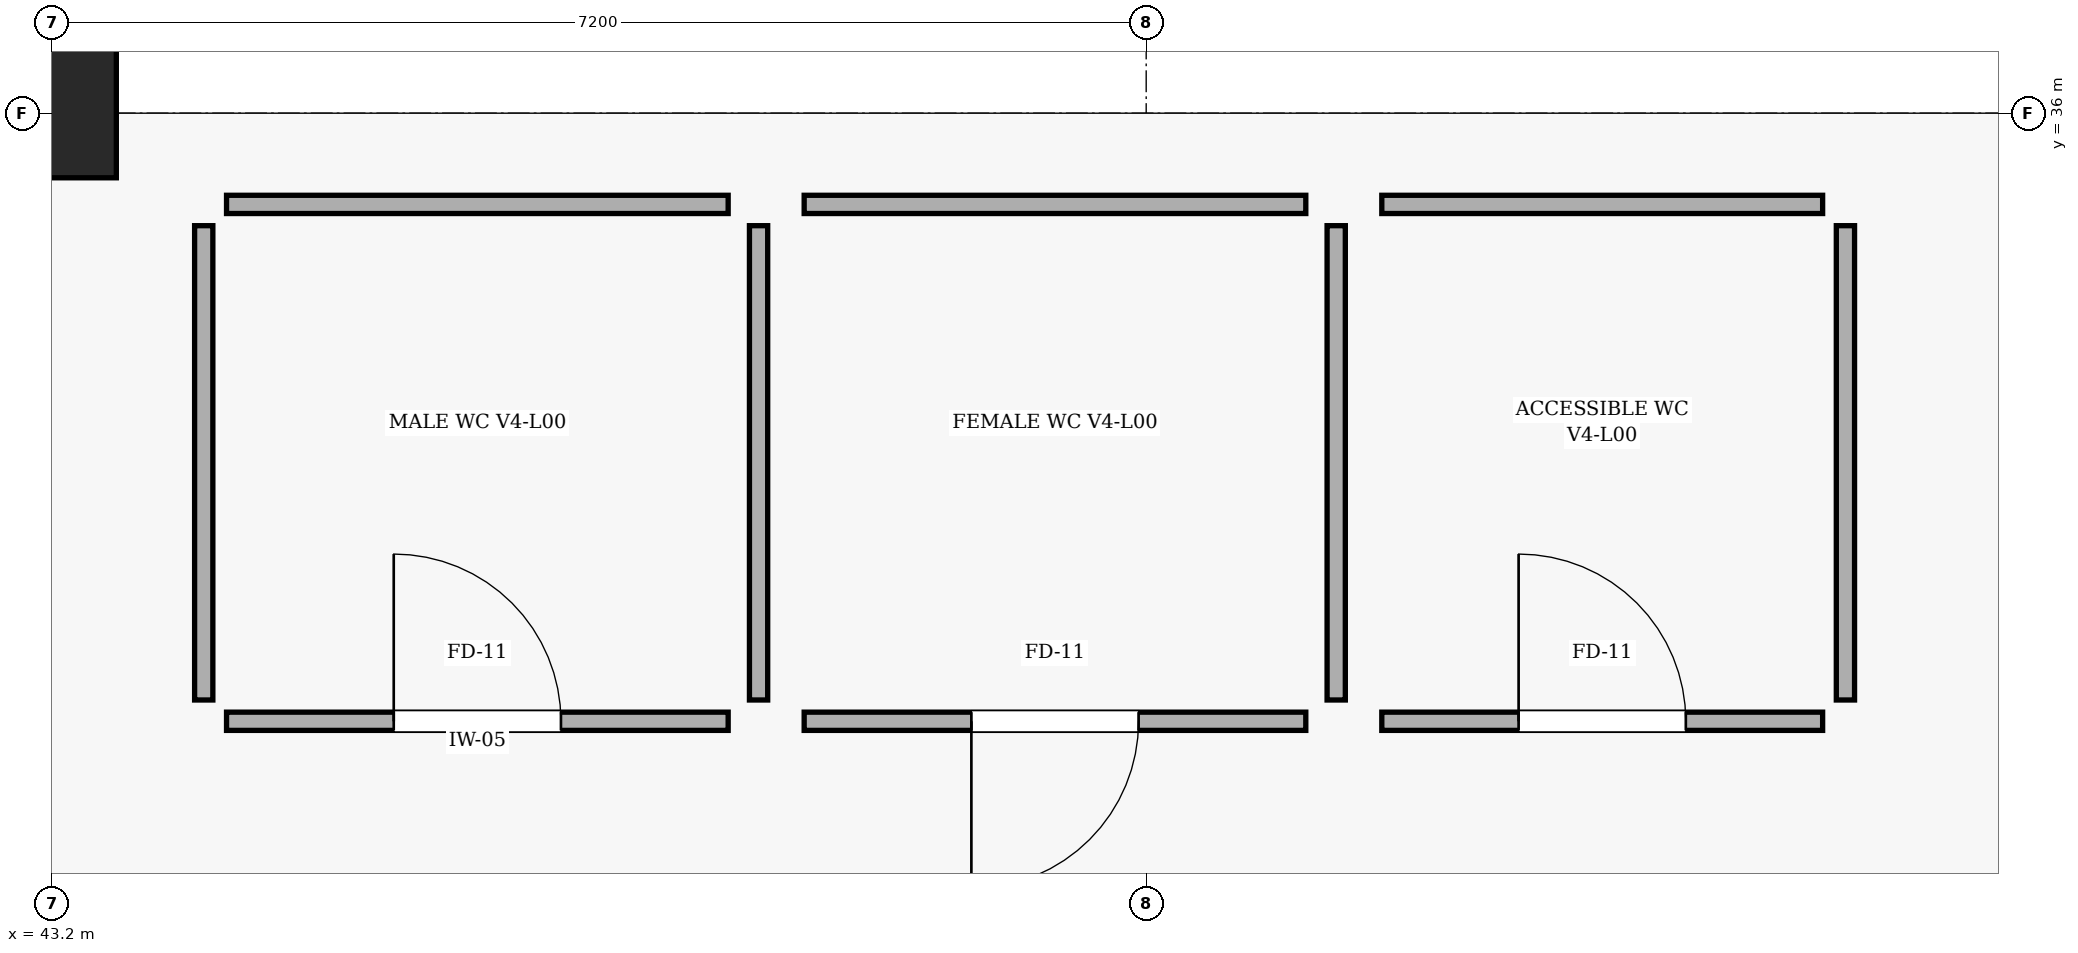
"""IFC4 building model, lengths in metres.
Left out: names, types, materials, properties, quantities, classifications, styles, units other than length and angle.
Written with IfcOpenShell. Run it as: python <this file> out.ifc"""

import sys

from ifc_helpers import new_model, si_unit, direction, frame, frame_2d, origin, origin_2d, place, context, subcontext, project, spatial, rectangle, extrude, element, fill, save


model = new_model("IFC4")
c1 = context("Model", 3, precision=1e-05, world=origin(), true_north=direction((0.0, 1.0)))
c2 = subcontext(c1, "Body", "Model", "MODEL_VIEW")
j1 = project(units=[si_unit("LENGTHUNIT", "METRE"), si_unit("PLANEANGLEUNIT", "RADIAN")], contexts=[c1])
p1 = place(None, origin())
s1 = spatial("IfcSite", under=j1, at=p1, CompositionType="ELEMENT")
p2 = place(p1, origin())
s2 = spatial("IfcBuilding", under=s1, at=p2, CompositionType="ELEMENT")
p3 = place(p2, origin())
s3 = spatial("IfcBuildingStorey", under=s2, at=p3, CompositionType="ELEMENT", Elevation=0.0)
p4 = place(p3, frame((43.2, 36.0, -1.65), z_axis=(0.0, 0.0, 1.0), x_axis=(1.0, 0.0, 0.0)))
e1 = element("IfcColumn", 1, at=p4, inside=s3, PredefinedType="COLUMN", context=c2, shape_type="SweptSolid", body=[
    extrude(rectangle(XDim=0.85, YDim=0.85, at=origin_2d()), origin(), (0.0, 0.0, 1.0), 7.05),
])
p5 = place(p3, frame((44.35, 32.0, 0.0), z_axis=(0.0, 0.0, 1.0), x_axis=(1.0, 0.0, 0.0)))
e2 = element("IfcWall", 2, at=p5, inside=s3, PredefinedType="PARTITIONING", context=c2, shape_type="SweptSolid", body=[
    extrude(rectangle(XDim=3.3, YDim=0.12, at=frame_2d((1.65, 0.0))), origin(), (0.0, 0.0, 1.0), 5.105),
])
p6 = place(p5, frame((1.1, 0.0, 0.0)))
e3 = element("IfcOpeningElement", 3, at=p6, cuts=e2, PredefinedType="OPENING", context=c2, shape_type="SweptSolid", body=[
    extrude(rectangle(XDim=1.1, YDim=2.15, at=frame_2d((0.55, 1.075))), frame((0.0, 0.07, 0.0), z_axis=(0.0, -1.0, 0.0), x_axis=(1.0, 0.0, 0.0)), (0.0, 0.0, 1.0), 0.14),
])
p7 = place(p3, frame((44.35, 35.4, 0.0), z_axis=(0.0, 0.0, 1.0), x_axis=(1.0, 0.0, 0.0)))
e4 = element("IfcWall", 4, at=p7, inside=s3, PredefinedType="PARTITIONING", context=c2, shape_type="SweptSolid", body=[
    extrude(rectangle(XDim=3.3, YDim=0.12, at=frame_2d((1.65, 0.0))), origin(), (0.0, 0.0, 1.0), 5.105),
])
for number, where, z_axis, x_axis in (
    (5, (44.2, 32.14, 0.0), (0.0, 0.0, 1.0), (0.0, 1.0, 0.0)),
    (6, (47.85, 32.14, 0.0), (0.0, 0.0, 1.0), (0.0, 1.0, 0.0)),
):
    element("IfcWall", number, at=place(p3, frame(where, z_axis=z_axis, x_axis=x_axis)), inside=s3, PredefinedType="PARTITIONING", context=c2, shape_type="SweptSolid", body=[
        extrude(rectangle(XDim=3.12, YDim=0.12, at=frame_2d((1.56, 0.0))), origin(), (0.0, 0.0, 1.0), 5.105),
    ])
p8 = place(p3, frame((48.15, 32.0, 0.0), z_axis=(0.0, 0.0, 1.0), x_axis=(1.0, 0.0, 0.0)))
e7 = element("IfcWall", 7, at=p8, inside=s3, PredefinedType="PARTITIONING", context=c2, shape_type="SweptSolid", body=[
    extrude(rectangle(XDim=3.3, YDim=0.12, at=frame_2d((1.65, 0.0))), origin(), (0.0, 0.0, 1.0), 4.555),
])
p9 = place(p8, frame((1.1, 0.0, 0.0)))
e8 = element("IfcOpeningElement", 8, at=p9, cuts=e7, PredefinedType="OPENING", context=c2, shape_type="SweptSolid", body=[
    extrude(rectangle(XDim=1.1, YDim=2.15, at=frame_2d((0.55, 1.075))), frame((0.0, 0.07, 0.0), z_axis=(0.0, -1.0, 0.0), x_axis=(1.0, 0.0, 0.0)), (0.0, 0.0, 1.0), 0.14),
])
p10 = place(p3, frame((48.15, 35.4, 0.0), z_axis=(0.0, 0.0, 1.0), x_axis=(1.0, 0.0, 0.0)))
e9 = element("IfcWall", 9, at=p10, inside=s3, PredefinedType="PARTITIONING", context=c2, shape_type="SweptSolid", body=[
    extrude(rectangle(XDim=3.3, YDim=0.12, at=frame_2d((1.65, 0.0))), origin(), (0.0, 0.0, 1.0), 4.555),
])
p11 = place(p3, frame((51.65, 32.14, 0.0), z_axis=(0.0, 0.0, 1.0), x_axis=(0.0, 1.0, 0.0)))
e10 = element("IfcWall", 10, at=p11, inside=s3, PredefinedType="PARTITIONING", context=c2, shape_type="SweptSolid", body=[
    extrude(rectangle(XDim=3.12, YDim=0.12, at=frame_2d((1.56, 0.0))), origin(), (0.0, 0.0, 1.0), 5.105),
])
p12 = place(p3, frame((51.95, 32.0, 0.0), z_axis=(0.0, 0.0, 1.0), x_axis=(1.0, 0.0, 0.0)))
e11 = element("IfcWall", 11, at=p12, inside=s3, PredefinedType="PARTITIONING", context=c2, shape_type="SweptSolid", body=[
    extrude(rectangle(XDim=2.9, YDim=0.12, at=frame_2d((1.45, 0.0))), origin(), (0.0, 0.0, 1.0), 5.105),
])
p13 = place(p12, frame((0.9, 0.0, 0.0)))
e12 = element("IfcOpeningElement", 12, at=p13, cuts=e11, PredefinedType="OPENING", context=c2, shape_type="SweptSolid", body=[
    extrude(rectangle(XDim=1.1, YDim=2.15, at=frame_2d((0.55, 1.075))), frame((0.0, 0.07, 0.0), z_axis=(0.0, -1.0, 0.0), x_axis=(1.0, 0.0, 0.0)), (0.0, 0.0, 1.0), 0.14),
])
p14 = place(p3, frame((51.95, 35.4, 0.0), z_axis=(0.0, 0.0, 1.0), x_axis=(1.0, 0.0, 0.0)))
e13 = element("IfcWall", 13, at=p14, inside=s3, PredefinedType="PARTITIONING", context=c2, shape_type="SweptSolid", body=[
    extrude(rectangle(XDim=2.9, YDim=0.12, at=frame_2d((1.45, 0.0))), origin(), (0.0, 0.0, 1.0), 5.105),
])
p15 = place(p3, frame((55.0, 32.14, 0.0), z_axis=(0.0, 0.0, 1.0), x_axis=(0.0, 1.0, 0.0)))
e14 = element("IfcWall", 14, at=p15, inside=s3, PredefinedType="PARTITIONING", context=c2, shape_type="SweptSolid", body=[
    extrude(rectangle(XDim=3.12, YDim=0.12, at=frame_2d((1.56, 0.0))), origin(), (0.0, 0.0, 1.0), 5.105),
])
p16 = place(p6, origin())
e15 = element("IfcDoor", 15, at=p16, inside=s3, OperationType="SINGLE_SWING_LEFT", PredefinedType="DOOR", context=c2, shape_type="SweptSolid", body=[
    extrude(rectangle(XDim=1.1, YDim=2.15, at=frame_2d((0.55, 1.075))), frame((0.0, 0.025, 0.0), z_axis=(0.0, -1.0, 0.0), x_axis=(1.0, 0.0, 0.0)), (0.0, 0.0, 1.0), 0.05),
])
fill(e3, e15)
p17 = place(p9, frame((1.1, 0.0, 0.0), z_axis=(0.0, 0.0, 1.0), x_axis=(-1.0, 0.0, 0.0)))
e16 = element("IfcDoor", 16, at=p17, inside=s3, OperationType="SINGLE_SWING_RIGHT", PredefinedType="DOOR", context=c2, shape_type="SweptSolid", body=[
    extrude(rectangle(XDim=1.1, YDim=2.15, at=frame_2d((0.55, 1.075))), frame((0.0, 0.025, 0.0), z_axis=(0.0, -1.0, 0.0), x_axis=(1.0, 0.0, 0.0)), (0.0, 0.0, 1.0), 0.05),
])
fill(e8, e16)
p18 = place(p13, origin())
e17 = element("IfcDoor", 17, at=p18, inside=s3, OperationType="SINGLE_SWING_LEFT", PredefinedType="DOOR", context=c2, shape_type="SweptSolid", body=[
    extrude(rectangle(XDim=1.1, YDim=2.15, at=frame_2d((0.55, 1.075))), frame((0.0, 0.025, 0.0), z_axis=(0.0, -1.0, 0.0), x_axis=(1.0, 0.0, 0.0)), (0.0, 0.0, 1.0), 0.05),
])
fill(e12, e17)
save(model, sys.argv[1])
